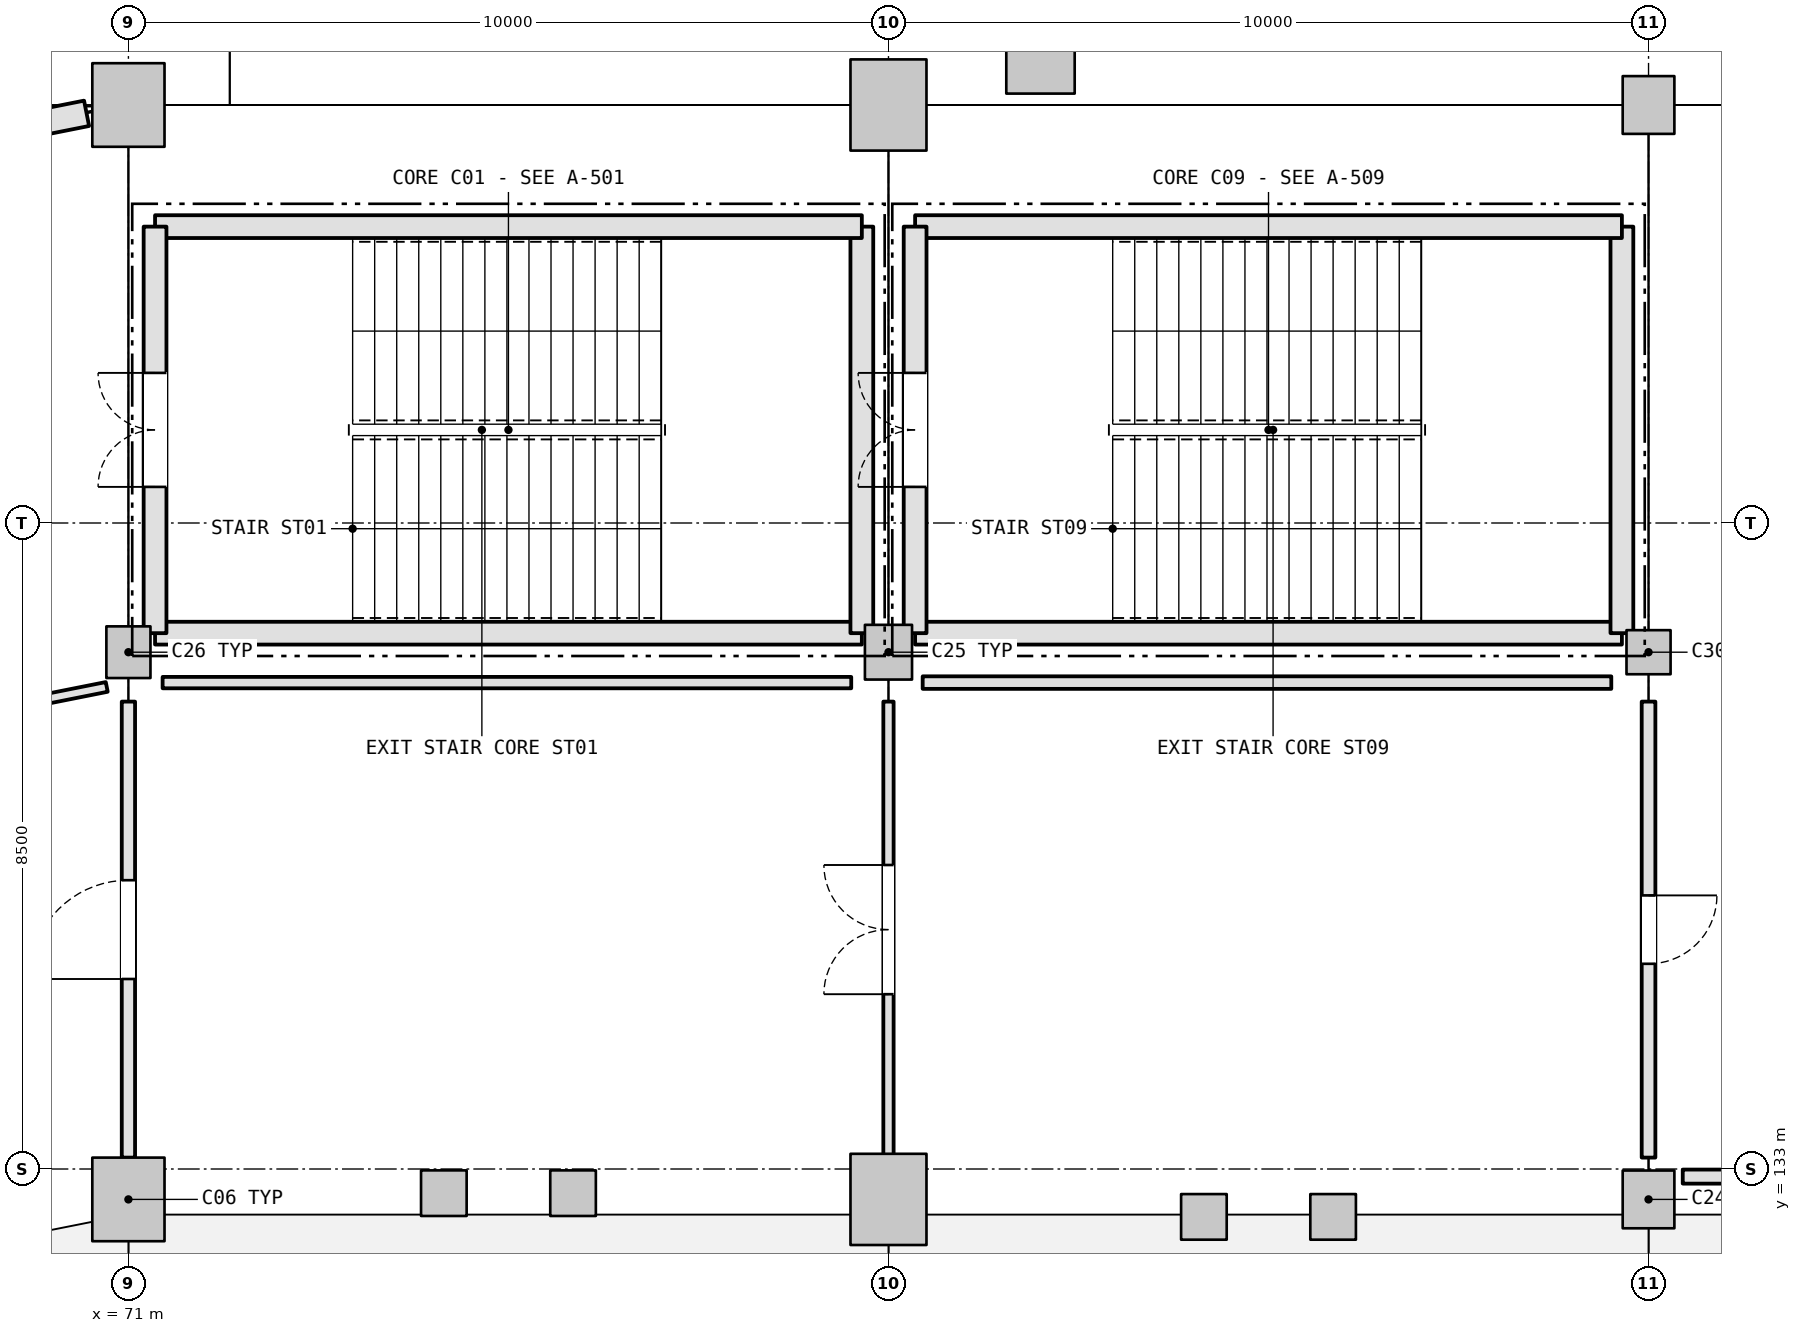
"""IFC4 building model, lengths in metres.
Left out: names, types, materials, properties, quantities, classifications, styles, units other than length and angle.
Written with IfcOpenShell. Run it as: python <this file> out.ifc"""

import sys

from ifc_helpers import new_model, si_unit, direction, frame, frame_2d, origin, origin_2d, place, context, subcontext, project, spatial, rectangle, extrude, element, fill, save


model = new_model("IFC4")
c1 = context("Model", 3, precision=1e-05, world=origin(), true_north=direction((0.0, 1.0)))
c2 = subcontext(c1, "Body", "Model", "MODEL_VIEW")
j1 = project(units=[si_unit("LENGTHUNIT", "METRE"), si_unit("PLANEANGLEUNIT", "RADIAN")], contexts=[c1])
p1 = place(None, origin())
s1 = spatial("IfcSite", under=j1, at=p1, CompositionType="ELEMENT")
p2 = place(p1, origin())
s2 = spatial("IfcBuilding", under=s1, at=p2, CompositionType="ELEMENT")
p3 = place(p2, origin())
s3 = spatial("IfcBuildingStorey", under=s2, at=p3, CompositionType="ELEMENT", Elevation=0.0)
p4 = place(p3, frame((91.0, 132.6, 0.0), z_axis=(0.0, 0.0, 1.0), x_axis=(1.0, 0.0, 0.0)))
e1 = element("IfcColumn", 1, at=p4, inside=s3, PredefinedType="COLUMN", context=c2, shape_type="SweptSolid", body=[
    extrude(rectangle(XDim=0.68, YDim=0.76, at=origin_2d()), origin(), (0.0, 0.0, 1.0), 5.4),
])
p5 = place(p3, frame((91.0, 139.8, 0.0), z_axis=(0.0, 0.0, 1.0), x_axis=(1.0, 0.0, 0.0)))
e2 = element("IfcColumn", 2, at=p5, inside=s3, PredefinedType="COLUMN", context=c2, shape_type="SweptSolid", body=[
    extrude(rectangle(XDim=0.58, YDim=0.58, at=origin_2d()), origin(), (0.0, 0.0, 1.0), 5.4),
])
p6 = place(p3, frame((91.0, 147.0, 0.0), z_axis=(0.0, 0.0, 1.0), x_axis=(1.0, 0.0, 0.0)))
e3 = element("IfcColumn", 3, at=p6, inside=s3, PredefinedType="COLUMN", context=c2, shape_type="SweptSolid", body=[
    extrude(rectangle(XDim=0.68, YDim=0.76, at=origin_2d()), origin(), (0.0, 0.0, 1.0), 5.4),
])
p7 = place(p3, frame((81.0, 132.6, 0.0), z_axis=(0.0, 0.0, 1.0), x_axis=(1.0, 0.0, 0.0)))
e4 = element("IfcColumn", 4, at=p7, inside=s3, PredefinedType="COLUMN", context=c2, shape_type="SweptSolid", body=[
    extrude(rectangle(XDim=1.0, YDim=1.2, at=origin_2d()), origin(), (0.0, 0.0, 1.0), 5.4),
])
p8 = place(p3, frame((81.0, 139.8, 0.0), z_axis=(0.0, 0.0, 1.0), x_axis=(1.0, 0.0, 0.0)))
e5 = element("IfcColumn", 5, at=p8, inside=s3, PredefinedType="COLUMN", context=c2, shape_type="SweptSolid", body=[
    extrude(rectangle(XDim=0.62, YDim=0.72, at=origin_2d()), origin(), (0.0, 0.0, 1.0), 5.4),
])
p9 = place(p3, frame((81.0, 147.0, 0.0), z_axis=(0.0, 0.0, 1.0), x_axis=(1.0, 0.0, 0.0)))
e6 = element("IfcColumn", 6, at=p9, inside=s3, PredefinedType="COLUMN", context=c2, shape_type="SweptSolid", body=[
    extrude(rectangle(XDim=1.0, YDim=1.2, at=origin_2d()), origin(), (0.0, 0.0, 1.0), 5.4),
])
p10 = place(p3, frame((71.0, 132.6, 0.0), z_axis=(0.0, 0.0, 1.0), x_axis=(1.0, 0.0, 0.0)))
e7 = element("IfcColumn", 7, at=p10, inside=s3, PredefinedType="COLUMN", context=c2, shape_type="SweptSolid", body=[
    extrude(rectangle(XDim=0.95, YDim=1.1, at=origin_2d()), origin(), (0.0, 0.0, 1.0), 5.4),
])
p11 = place(p3, frame((71.0, 139.8, 0.0), z_axis=(0.0, 0.0, 1.0), x_axis=(1.0, 0.0, 0.0)))
e8 = element("IfcColumn", 8, at=p11, inside=s3, PredefinedType="COLUMN", context=c2, shape_type="SweptSolid", body=[
    extrude(rectangle(XDim=0.58, YDim=0.68, at=origin_2d()), origin(), (0.0, 0.0, 1.0), 5.4),
])
p12 = place(p3, frame((71.0, 147.0, 0.0), z_axis=(0.0, 0.0, 1.0), x_axis=(1.0, 0.0, 0.0)))
e9 = element("IfcColumn", 9, at=p12, inside=s3, PredefinedType="COLUMN", context=c2, shape_type="SweptSolid", body=[
    extrude(rectangle(XDim=0.95, YDim=1.1, at=origin_2d()), origin(), (0.0, 0.0, 1.0), 5.4),
])
p13 = place(p3, frame((83.0, 147.6, 0.0), z_axis=(0.0, 0.0, 1.0), x_axis=(1.0, 0.0, 0.0)))
e10 = element("IfcColumn", 10, at=p13, inside=s3, PredefinedType="COLUMN", context=c2, shape_type="SweptSolid", body=[
    extrude(rectangle(XDim=0.9, YDim=0.9, at=origin_2d()), origin(), (0.0, 0.0, 1.0), 5.4),
])
p14 = place(p3, frame((70.45, 146.89, 0.0), z_axis=(0.0, 0.0, 1.0), x_axis=(-0.980787488403, -0.195079221324, 0.0)))
e11 = element("IfcWall", 11, at=p14, inside=s3, PredefinedType="SOLIDWALL", context=c2, shape_type="SweptSolid", body=[
    extrude(rectangle(XDim=19.246, YDim=0.34, at=frame_2d((9.623, 0.0))), origin(), (0.0, 0.0, 1.0), 4.275),
])
p15 = place(p14, frame((8.823, 0.0, 2.4)))
e12 = element("IfcOpeningElement", 12, at=p15, cuts=e11, PredefinedType="OPENING", context=c2, shape_type="SweptSolid", body=[
    extrude(rectangle(XDim=1.6, YDim=1.2, at=frame_2d((0.8, 0.6))), frame((0.0, 0.18, 0.0), z_axis=(0.0, -1.0, 0.0), x_axis=(1.0, 0.0, 0.0)), (0.0, 0.0, 1.0), 0.36),
])
p16 = place(p3, frame((71.35, 140.05, 0.0), z_axis=(0.0, 0.0, 1.0), x_axis=(1.0, 0.0, 0.0)))
e13 = element("IfcWall", 13, at=p16, inside=s3, PredefinedType="SHEAR", context=c2, shape_type="SweptSolid", body=[
    extrude(rectangle(XDim=9.299, YDim=0.3, at=frame_2d((4.65, 0.0))), origin(), (0.0, 0.0, 1.0), 5.14),
])
p17 = place(p3, frame((80.65, 140.05, 0.0), z_axis=(0.0, 0.0, 1.0), x_axis=(0.0, 1.0, 0.0)))
e14 = element("IfcWall", 14, at=p17, inside=s3, PredefinedType="SHEAR", context=c2, shape_type="SweptSolid", body=[
    extrude(rectangle(XDim=5.349, YDim=0.3, at=frame_2d((2.675, 0.0))), origin(), (0.0, 0.0, 1.0), 5.14),
])
p18 = place(p3, frame((80.65, 145.4, 0.0), z_axis=(0.0, 0.0, 1.0), x_axis=(-1.0, 0.0, 0.0)))
e15 = element("IfcWall", 15, at=p18, inside=s3, PredefinedType="SHEAR", context=c2, shape_type="SweptSolid", body=[
    extrude(rectangle(XDim=9.299, YDim=0.3, at=frame_2d((4.65, 0.0))), origin(), (0.0, 0.0, 1.0), 5.14),
])
p19 = place(p3, frame((71.35, 145.4, 0.0), z_axis=(0.0, 0.0, 1.0), x_axis=(0.0, -1.0, 0.0)))
e16 = element("IfcWall", 16, at=p19, inside=s3, PredefinedType="SHEAR", context=c2, shape_type="SweptSolid", body=[
    extrude(rectangle(XDim=5.349, YDim=0.3, at=frame_2d((2.675, 0.0))), origin(), (0.0, 0.0, 1.0), 5.14),
])
p20 = place(p19, frame((1.925, 0.0, 0.0)))
e17 = element("IfcOpeningElement", 17, at=p20, cuts=e16, PredefinedType="OPENING", context=c2, shape_type="SweptSolid", body=[
    extrude(rectangle(XDim=1.5, YDim=2.2, at=frame_2d((0.75, 1.1))), frame((0.0, 0.16, 0.0), z_axis=(0.0, -1.0, 0.0), x_axis=(1.0, 0.0, 0.0)), (0.0, 0.0, 1.0), 0.32),
])
p21 = place(p3, frame((81.35, 140.05, 0.0), z_axis=(0.0, 0.0, 1.0), x_axis=(1.0, 0.0, 0.0)))
e18 = element("IfcWall", 18, at=p21, inside=s3, PredefinedType="SHEAR", context=c2, shape_type="SweptSolid", body=[
    extrude(rectangle(XDim=9.299, YDim=0.3, at=frame_2d((4.65, 0.0))), origin(), (0.0, 0.0, 1.0), 5.14),
])
p22 = place(p3, frame((90.65, 140.05, 0.0), z_axis=(0.0, 0.0, 1.0), x_axis=(0.0, 1.0, 0.0)))
e19 = element("IfcWall", 19, at=p22, inside=s3, PredefinedType="SHEAR", context=c2, shape_type="SweptSolid", body=[
    extrude(rectangle(XDim=5.349, YDim=0.3, at=frame_2d((2.675, 0.0))), origin(), (0.0, 0.0, 1.0), 5.14),
])
p23 = place(p3, frame((90.65, 145.4, 0.0), z_axis=(0.0, 0.0, 1.0), x_axis=(-1.0, 0.0, 0.0)))
e20 = element("IfcWall", 20, at=p23, inside=s3, PredefinedType="SHEAR", context=c2, shape_type="SweptSolid", body=[
    extrude(rectangle(XDim=9.299, YDim=0.3, at=frame_2d((4.65, 0.0))), origin(), (0.0, 0.0, 1.0), 5.14),
])
p24 = place(p3, frame((81.35, 145.4, 0.0), z_axis=(0.0, 0.0, 1.0), x_axis=(0.0, -1.0, 0.0)))
e21 = element("IfcWall", 21, at=p24, inside=s3, PredefinedType="SHEAR", context=c2, shape_type="SweptSolid", body=[
    extrude(rectangle(XDim=5.349, YDim=0.3, at=frame_2d((2.675, 0.0))), origin(), (0.0, 0.0, 1.0), 5.14),
])
p25 = place(p24, frame((1.925, 0.0, 0.0)))
e22 = element("IfcOpeningElement", 22, at=p25, cuts=e21, PredefinedType="OPENING", context=c2, shape_type="SweptSolid", body=[
    extrude(rectangle(XDim=1.5, YDim=2.2, at=frame_2d((0.75, 1.1))), frame((0.0, 0.16, 0.0), z_axis=(0.0, -1.0, 0.0), x_axis=(1.0, 0.0, 0.0)), (0.0, 0.0, 1.0), 0.32),
])
for number, where, z_axis, x_axis in (
    (23, (85.15, 132.37, 0.0), (0.0, 0.0, 1.0), (1.0, 0.0, 0.0)),
    (24, (86.85, 132.37, 0.0), (0.0, 0.0, 1.0), (1.0, 0.0, 0.0)),
    (25, (75.15, 132.682, 0.0), (0.0, 0.0, 1.0), (1.0, 0.0, 0.0)),
    (26, (76.85, 132.682, 0.0), (0.0, 0.0, 1.0), (1.0, 0.0, 0.0)),
):
    element("IfcColumn", number, at=place(p3, frame(where, z_axis=z_axis, x_axis=x_axis)), inside=s3, PredefinedType="COLUMN", context=c2, shape_type="SweptSolid", body=[
        extrude(rectangle(XDim=0.6, YDim=0.6, at=origin_2d()), origin(), (0.0, 0.0, 1.0), 5.4),
    ])
p26 = place(p3, frame((91.0, 133.15, 0.0), z_axis=(0.0, 0.0, 1.0), x_axis=(0.0, 1.0, 0.0)))
e27 = element("IfcWall", 27, at=p26, inside=s3, PredefinedType="PARTITIONING", context=c2, shape_type="SweptSolid", body=[
    extrude(rectangle(XDim=6.0, YDim=0.18, at=frame_2d((3.0, 0.0))), origin(), (0.0, 0.0, 1.0), 4.305),
])
p27 = place(p26, frame((2.55, 0.0, 0.0)))
e28 = element("IfcOpeningElement", 28, at=p27, cuts=e27, PredefinedType="OPENING", context=c2, shape_type="SweptSolid", body=[
    extrude(rectangle(XDim=0.9, YDim=2.1, at=frame_2d((0.45, 1.05))), frame((0.0, 0.1, 0.0), z_axis=(0.0, -1.0, 0.0), x_axis=(1.0, 0.0, 0.0)), (0.0, 0.0, 1.0), 0.2),
])
p28 = place(p3, frame((100.51, 132.9, 0.0), z_axis=(0.0, 0.0, 1.0), x_axis=(-1.0, 0.0, 0.0)))
e29 = element("IfcWall", 29, at=p28, inside=s3, PredefinedType="PARTITIONING", context=c2, shape_type="SweptSolid", body=[
    extrude(rectangle(XDim=9.06, YDim=0.185, at=frame_2d((4.53, 0.0))), origin(), (0.0, 0.0, 1.0), 4.325),
])
p29 = place(p3, frame((81.0, 133.15, 0.0), z_axis=(0.0, 0.0, 1.0), x_axis=(0.0, 1.0, 0.0)))
e30 = element("IfcWall", 30, at=p29, inside=s3, PredefinedType="PARTITIONING", context=c2, shape_type="SweptSolid", body=[
    extrude(rectangle(XDim=6.0, YDim=0.135, at=frame_2d((3.0, 0.0))), origin(), (0.0, 0.0, 1.0), 4.345),
])
p30 = place(p29, frame((2.15, 0.0, 0.0)))
e31 = element("IfcOpeningElement", 31, at=p30, cuts=e30, PredefinedType="OPENING", context=c2, shape_type="SweptSolid", body=[
    extrude(rectangle(XDim=1.7, YDim=2.25, at=frame_2d((0.85, 1.125))), frame((0.0, 0.077, 0.0), z_axis=(0.0, -1.0, 0.0), x_axis=(1.0, 0.0, 0.0)), (0.0, 0.0, 1.0), 0.155),
])
p31 = place(p3, frame((81.45, 139.4, 0.0), z_axis=(0.0, 0.0, 1.0), x_axis=(1.0, 0.0, 0.0)))
e32 = element("IfcWall", 32, at=p31, inside=s3, PredefinedType="PARTITIONING", context=c2, shape_type="SweptSolid", body=[
    extrude(rectangle(XDim=9.06, YDim=0.165, at=frame_2d((4.53, 0.0))), origin(), (0.0, 0.0, 1.0), 5.12),
])
p32 = place(p3, frame((71.0, 133.15, 0.0), z_axis=(0.0, 0.0, 1.0), x_axis=(0.0, 1.0, 0.0)))
e33 = element("IfcWall", 33, at=p32, inside=s3, PredefinedType="PARTITIONING", context=c2, shape_type="SweptSolid", body=[
    extrude(rectangle(XDim=6.0, YDim=0.175, at=frame_2d((3.0, 0.0))), origin(), (0.0, 0.0, 1.0), 4.375),
])
p33 = place(p32, frame((2.35, 0.0, 0.0)))
e34 = element("IfcOpeningElement", 34, at=p33, cuts=e33, PredefinedType="OPENING", context=c2, shape_type="SweptSolid", body=[
    extrude(rectangle(XDim=1.3, YDim=2.2, at=frame_2d((0.65, 1.1))), frame((0.0, 0.097, 0.0), z_axis=(0.0, -1.0, 0.0), x_axis=(1.0, 0.0, 0.0)), (0.0, 0.0, 1.0), 0.195),
])
p34 = place(p3, frame((71.45, 139.4, 0.0), z_axis=(0.0, 0.0, 1.0), x_axis=(1.0, 0.0, 0.0)))
e35 = element("IfcWall", 35, at=p34, inside=s3, PredefinedType="PARTITIONING", context=c2, shape_type="SweptSolid", body=[
    extrude(rectangle(XDim=9.06, YDim=0.15, at=frame_2d((4.53, 0.0))), origin(), (0.0, 0.0, 1.0), 5.12),
])
p35 = place(p3, frame((54.254, 136.069, 0.0), z_axis=(0.0, 0.0, 1.0), x_axis=(0.980786027867, 0.195086564225, 0.0)))
e36 = element("IfcWall", 36, at=p35, inside=s3, PredefinedType="PARTITIONING", context=c2, shape_type="SweptSolid", body=[
    extrude(rectangle(XDim=16.783, YDim=0.13, at=frame_2d((8.392, 0.0))), origin(), (0.0, 0.0, 1.0), 4.375),
])
p36 = place(p35, frame((7.912, 0.0, 0.0)))
e37 = element("IfcOpeningElement", 37, at=p36, cuts=e36, PredefinedType="OPENING", context=c2, shape_type="SweptSolid", body=[
    extrude(rectangle(XDim=0.96, YDim=2.15, at=frame_2d((0.48, 1.075))), frame((0.0, 0.075, 0.0), z_axis=(0.0, -1.0, 0.0), x_axis=(1.0, 0.0, 0.0)), (0.0, 0.0, 1.0), 0.15),
])
p37 = place(p20, frame((1.5, 0.0, 0.0), z_axis=(0.0, 0.0, 1.0), x_axis=(-1.0, 0.0, 0.0)))
e38 = element("IfcDoor", 38, at=p37, inside=s3, OperationType="DOUBLE_DOOR_SINGLE_SWING", PredefinedType="DOOR", context=c2, shape_type="SweptSolid", body=[
    extrude(rectangle(XDim=1.5, YDim=2.2, at=frame_2d((0.75, 1.1))), frame((0.0, 0.025, 0.0), z_axis=(0.0, -1.0, 0.0), x_axis=(1.0, 0.0, 0.0)), (0.0, 0.0, 1.0), 0.05),
])
fill(e17, e38)
p38 = place(p25, frame((1.5, 0.0, 0.0), z_axis=(0.0, 0.0, 1.0), x_axis=(-1.0, 0.0, 0.0)))
e39 = element("IfcDoor", 39, at=p38, inside=s3, OperationType="DOUBLE_DOOR_SINGLE_SWING", PredefinedType="DOOR", context=c2, shape_type="SweptSolid", body=[
    extrude(rectangle(XDim=1.5, YDim=2.2, at=frame_2d((0.75, 1.1))), frame((0.0, 0.025, 0.0), z_axis=(0.0, -1.0, 0.0), x_axis=(1.0, 0.0, 0.0)), (0.0, 0.0, 1.0), 0.05),
])
fill(e22, e39)
p39 = place(p27, frame((0.9, 0.0, 0.0), z_axis=(0.0, 0.0, 1.0), x_axis=(-1.0, 0.0, 0.0)))
e40 = element("IfcDoor", 40, at=p39, inside=s3, OperationType="SINGLE_SWING_RIGHT", PredefinedType="DOOR", context=c2, shape_type="SweptSolid", body=[
    extrude(rectangle(XDim=0.9, YDim=2.1, at=frame_2d((0.45, 1.05))), frame((0.0, 0.025, 0.0), z_axis=(0.0, -1.0, 0.0), x_axis=(1.0, 0.0, 0.0)), (0.0, 0.0, 1.0), 0.05),
])
fill(e28, e40)
p40 = place(p30, origin())
e41 = element("IfcDoor", 41, at=p40, inside=s3, OperationType="DOUBLE_DOOR_SINGLE_SWING", PredefinedType="DOOR", context=c2, shape_type="SweptSolid", body=[
    extrude(rectangle(XDim=1.7, YDim=2.25, at=frame_2d((0.85, 1.125))), frame((0.0, 0.025, 0.0), z_axis=(0.0, -1.0, 0.0), x_axis=(1.0, 0.0, 0.0)), (0.0, 0.0, 1.0), 0.05),
])
fill(e31, e41)
p41 = place(p33, origin())
e42 = element("IfcDoor", 42, at=p41, inside=s3, OperationType="SINGLE_SWING_LEFT", PredefinedType="DOOR", context=c2, shape_type="SweptSolid", body=[
    extrude(rectangle(XDim=1.3, YDim=2.2, at=frame_2d((0.65, 1.1))), frame((0.0, 0.025, 0.0), z_axis=(0.0, -1.0, 0.0), x_axis=(1.0, 0.0, 0.0)), (0.0, 0.0, 1.0), 0.05),
])
fill(e34, e42)
save(model, sys.argv[1])
